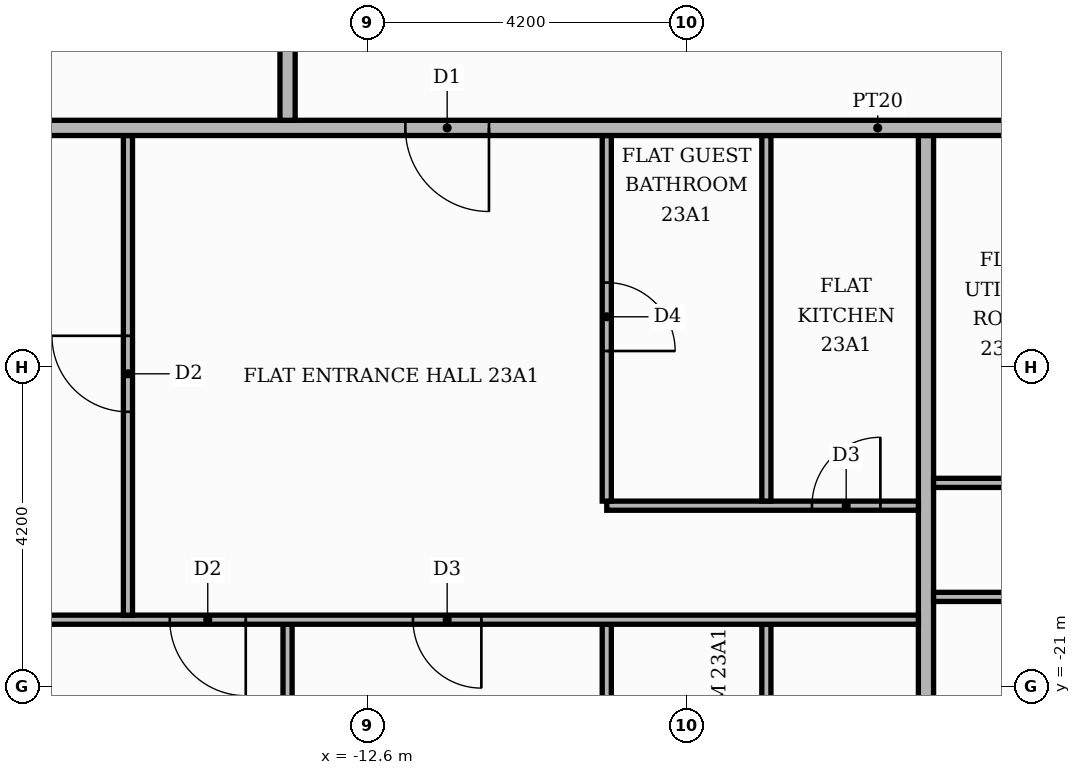
"""IFC4 building model, lengths in metres.
Left out: names, types, materials, properties, quantities, classifications, styles, units other than length and angle.
Written with IfcOpenShell. Run it as: python <this file> out.ifc"""

import sys

from ifc_helpers import new_model, si_unit, direction, frame, frame_2d, origin, place, context, subcontext, project, spatial, rectangle, extrude, element, fill, save


model = new_model("IFC4")
c1 = context("Model", 3, precision=1e-05, world=origin(), true_north=direction((0.0, 1.0)))
c2 = subcontext(c1, "Body", "Model", "MODEL_VIEW")
j1 = project(units=[si_unit("LENGTHUNIT", "METRE"), si_unit("PLANEANGLEUNIT", "RADIAN")], contexts=[c1])
p1 = place(None, origin())
s1 = spatial("IfcSite", under=j1, at=p1, CompositionType="ELEMENT")
p2 = place(p1, origin())
s2 = spatial("IfcBuilding", under=s1, at=p2, CompositionType="ELEMENT")
p3 = place(p2, frame((0.0, 0.0, 98.7)))
s3 = spatial("IfcBuildingStorey", under=s2, at=p3, CompositionType="ELEMENT", Elevation=98.7)
p4 = place(p3, frame((-13.65, -25.42, 0.0), z_axis=(0.0, 0.0, 1.0), x_axis=(0.0, 1.0, 0.0)))
e1 = element("IfcWall", 1, at=p4, inside=s3, PredefinedType="PARTITIONING", context=c2, shape_type="SweptSolid", body=[
    extrude(rectangle(XDim=5.24, YDim=0.12, at=frame_2d((2.62, 0.0))), origin(), (0.0, 0.0, 1.0), 3.48),
])
p5 = place(p3, frame((-9.45, -25.42, 0.0), z_axis=(0.0, 0.0, 1.0), x_axis=(0.0, 1.0, 0.0)))
e2 = element("IfcWall", 2, at=p5, inside=s3, PredefinedType="PARTITIONING", context=c2, shape_type="SweptSolid", body=[
    extrude(rectangle(XDim=5.24, YDim=0.12, at=frame_2d((2.62, 0.0))), origin(), (0.0, 0.0, 1.0), 3.48),
])
p6 = place(p5, frame((2.05, 0.0, 0.0)))
e3 = element("IfcOpeningElement", 3, at=p6, cuts=e2, PredefinedType="OPENING", context=c2, shape_type="SweptSolid", body=[
    extrude(rectangle(XDim=0.9, YDim=2.1, at=frame_2d((0.45, 1.05))), frame((0.0, 0.07, 0.0), z_axis=(0.0, -1.0, 0.0), x_axis=(1.0, 0.0, 0.0)), (0.0, 0.0, 1.0), 0.14),
])
p7 = place(p3, frame((-7.35, -25.42, 0.0), z_axis=(0.0, 0.0, 1.0), x_axis=(0.0, 1.0, 0.0)))
e4 = element("IfcWall", 4, at=p7, inside=s3, PredefinedType="PARTITIONING", context=c2, shape_type="SweptSolid", body=[
    extrude(rectangle(XDim=5.24, YDim=0.12, at=frame_2d((2.62, 0.0))), origin(), (0.0, 0.0, 1.0), 3.48),
])
p8 = place(p7, frame((2.05, 0.0, 0.0)))
e5 = element("IfcOpeningElement", 5, at=p8, cuts=e4, PredefinedType="OPENING", context=c2, shape_type="SweptSolid", body=[
    extrude(rectangle(XDim=0.9, YDim=2.1, at=frame_2d((0.45, 1.05))), frame((0.0, 0.07, 0.0), z_axis=(0.0, -1.0, 0.0), x_axis=(1.0, 0.0, 0.0)), (0.0, 0.0, 1.0), 0.14),
])
p9 = place(p3, frame((-5.25, -25.42, 0.0), z_axis=(0.0, 0.0, 1.0), x_axis=(0.0, 1.0, 0.0)))
e6 = element("IfcWall", 6, at=p9, inside=s3, PredefinedType="PARTITIONING", context=c2, shape_type="SweptSolid", body=[
    extrude(rectangle(XDim=11.67, YDim=0.2, at=frame_2d((5.835, 0.0))), origin(), (0.0, 0.0, 1.0), 3.48),
])
p10 = place(p3, frame((-17.4, -20.12, 0.0), z_axis=(0.0, 0.0, 1.0), x_axis=(1.0, 0.0, 0.0)))
e7 = element("IfcWall", 7, at=p10, inside=s3, PredefinedType="PARTITIONING", context=c2, shape_type="SweptSolid", body=[
    extrude(rectangle(XDim=12.05, YDim=0.12, at=frame_2d((6.025, 0.0))), origin(), (0.0, 0.0, 1.0), 3.48),
])
p11 = place(p10, frame((2.2, 0.0, 0.0)))
e8 = element("IfcOpeningElement", 8, at=p11, cuts=e7, PredefinedType="OPENING", context=c2, shape_type="SweptSolid", body=[
    extrude(rectangle(XDim=1.0, YDim=2.1, at=frame_2d((0.5, 1.05))), frame((0.0, 0.07, 0.0), z_axis=(0.0, -1.0, 0.0), x_axis=(1.0, 0.0, 0.0)), (0.0, 0.0, 1.0), 0.14),
])
p12 = place(p10, frame((5.4, 0.0, 0.0)))
e9 = element("IfcOpeningElement", 9, at=p12, cuts=e7, PredefinedType="OPENING", context=c2, shape_type="SweptSolid", body=[
    extrude(rectangle(XDim=0.9, YDim=2.1, at=frame_2d((0.45, 1.05))), frame((0.0, 0.07, 0.0), z_axis=(0.0, -1.0, 0.0), x_axis=(1.0, 0.0, 0.0)), (0.0, 0.0, 1.0), 0.14),
])
p13 = place(p3, frame((-15.75, -20.06, 0.0), z_axis=(0.0, 0.0, 1.0), x_axis=(0.0, 1.0, 0.0)))
e10 = element("IfcWall", 10, at=p13, inside=s3, PredefinedType="PARTITIONING", context=c2, shape_type="SweptSolid", body=[
    extrude(rectangle(XDim=6.31, YDim=0.12, at=frame_2d((3.155, 0.0))), origin(), (0.0, 0.0, 1.0), 3.48),
])
p14 = place(p13, frame((2.675, 0.0, 0.0)))
e11 = element("IfcOpeningElement", 11, at=p14, cuts=e10, PredefinedType="OPENING", context=c2, shape_type="SweptSolid", body=[
    extrude(rectangle(XDim=1.0, YDim=2.1, at=frame_2d((0.5, 1.05))), frame((0.0, 0.07, 0.0), z_axis=(0.0, -1.0, 0.0), x_axis=(1.0, 0.0, 0.0)), (0.0, 0.0, 1.0), 0.14),
])
p15 = place(p3, frame((-5.15, -19.82, 0.0), z_axis=(0.0, 0.0, 1.0), x_axis=(1.0, 0.0, 0.0)))
e12 = element("IfcWall", 12, at=p15, inside=s3, PredefinedType="PARTITIONING", context=c2, shape_type="SweptSolid", body=[
    extrude(rectangle(XDim=18.7, YDim=0.12, at=frame_2d((9.35, 0.0))), origin(), (0.0, 0.0, 1.0), 3.48),
])
p16 = place(p15, frame((1.5, 0.0, 0.0)))
e13 = element("IfcOpeningElement", 13, at=p16, cuts=e12, PredefinedType="OPENING", context=c2, shape_type="SweptSolid", body=[
    extrude(rectangle(XDim=1.0, YDim=2.1, at=frame_2d((0.5, 1.05))), frame((0.0, 0.07, 0.0), z_axis=(0.0, -1.0, 0.0), x_axis=(1.0, 0.0, 0.0)), (0.0, 0.0, 1.0), 0.14),
])
p17 = place(p15, frame((5.75, 0.0, 0.0)))
e14 = element("IfcOpeningElement", 14, at=p17, cuts=e12, PredefinedType="OPENING", context=c2, shape_type="SweptSolid", body=[
    extrude(rectangle(XDim=0.9, YDim=2.1, at=frame_2d((0.45, 1.05))), frame((0.0, 0.07, 0.0), z_axis=(0.0, -1.0, 0.0), x_axis=(1.0, 0.0, 0.0)), (0.0, 0.0, 1.0), 0.14),
])
p18 = place(p15, frame((14.15, 0.0, 0.0)))
e15 = element("IfcOpeningElement", 15, at=p18, cuts=e12, PredefinedType="OPENING", context=c2, shape_type="SweptSolid", body=[
    extrude(rectangle(XDim=0.9, YDim=2.1, at=frame_2d((0.45, 1.05))), frame((0.0, 0.07, 0.0), z_axis=(0.0, -1.0, 0.0), x_axis=(1.0, 0.0, 0.0)), (0.0, 0.0, 1.0), 0.14),
])
p19 = place(p3, frame((-9.45, -18.62, 0.0), z_axis=(0.0, 0.0, 1.0), x_axis=(1.0, 0.0, 0.0)))
e16 = element("IfcWall", 16, at=p19, inside=s3, PredefinedType="PARTITIONING", context=c2, shape_type="SweptSolid", body=[
    extrude(rectangle(XDim=4.1, YDim=0.12, at=frame_2d((2.05, 0.0))), origin(), (0.0, 0.0, 1.0), 3.48),
])
p20 = place(p19, frame((2.7, 0.0, 0.0)))
e17 = element("IfcOpeningElement", 17, at=p20, cuts=e16, PredefinedType="OPENING", context=c2, shape_type="SweptSolid", body=[
    extrude(rectangle(XDim=0.9, YDim=2.1, at=frame_2d((0.45, 1.05))), frame((0.0, 0.07, 0.0), z_axis=(0.0, -1.0, 0.0), x_axis=(1.0, 0.0, 0.0)), (0.0, 0.0, 1.0), 0.14),
])
p21 = place(p3, frame((-9.45, -18.56, 0.0), z_axis=(0.0, 0.0, 1.0), x_axis=(0.0, 1.0, 0.0)))
e18 = element("IfcWall", 18, at=p21, inside=s3, PredefinedType="PARTITIONING", context=c2, shape_type="SweptSolid", body=[
    extrude(rectangle(XDim=4.81, YDim=0.12, at=frame_2d((2.405, 0.0))), origin(), (0.0, 0.0, 1.0), 3.48),
])
p22 = place(p21, frame((1.975, 0.0, 0.0)))
e19 = element("IfcOpeningElement", 19, at=p22, cuts=e18, PredefinedType="OPENING", context=c2, shape_type="SweptSolid", body=[
    extrude(rectangle(XDim=0.9, YDim=2.1, at=frame_2d((0.45, 1.05))), frame((0.0, 0.07, 0.0), z_axis=(0.0, -1.0, 0.0), x_axis=(1.0, 0.0, 0.0)), (0.0, 0.0, 1.0), 0.14),
])
p23 = place(p3, frame((-7.35, -18.56, 0.0), z_axis=(0.0, 0.0, 1.0), x_axis=(0.0, 1.0, 0.0)))
e20 = element("IfcWall", 20, at=p23, inside=s3, PredefinedType="PARTITIONING", context=c2, shape_type="SweptSolid", body=[
    extrude(rectangle(XDim=4.81, YDim=0.12, at=frame_2d((2.405, 0.0))), origin(), (0.0, 0.0, 1.0), 3.48),
])
p24 = place(p3, frame((-5.15, -18.32, 0.0), z_axis=(0.0, 0.0, 1.0), x_axis=(1.0, 0.0, 0.0)))
e21 = element("IfcWall", 21, at=p24, inside=s3, PredefinedType="PARTITIONING", context=c2, shape_type="SweptSolid", body=[
    extrude(rectangle(XDim=2.0, YDim=0.12, at=frame_2d((1.0, 0.0))), origin(), (0.0, 0.0, 1.0), 3.48),
])
p25 = place(p3, frame((-25.42, -13.65, 0.0), z_axis=(0.0, 0.0, 1.0), x_axis=(1.0, 0.0, 0.0)))
e22 = element("IfcWall", 22, at=p25, inside=s3, PredefinedType="PARTITIONING", context=c2, shape_type="SweptSolid", body=[
    extrude(rectangle(XDim=39.07, YDim=0.2, at=frame_2d((19.535, 0.0))), origin(), (0.0, 0.0, 1.0), 3.48),
])
p26 = place(p25, frame((13.32, 0.0, 0.0)))
e23 = element("IfcOpeningElement", 23, at=p26, cuts=e22, PredefinedType="OPENING", context=c2, shape_type="SweptSolid", body=[
    extrude(rectangle(XDim=1.1, YDim=2.4, at=frame_2d((0.55, 1.2))), frame((0.0, 0.11, 0.0), z_axis=(0.0, -1.0, 0.0), x_axis=(1.0, 0.0, 0.0)), (0.0, 0.0, 1.0), 0.22),
])
p27 = place(p25, frame((23.82, 0.0, 0.0)))
e24 = element("IfcOpeningElement", 24, at=p27, cuts=e22, PredefinedType="OPENING", context=c2, shape_type="SweptSolid", body=[
    extrude(rectangle(XDim=1.1, YDim=2.4, at=frame_2d((0.55, 1.2))), frame((0.0, 0.11, 0.0), z_axis=(0.0, -1.0, 0.0), x_axis=(1.0, 0.0, 0.0)), (0.0, 0.0, 1.0), 0.22),
])
p28 = place(p3, frame((-13.65, -13.55, 0.0), z_axis=(0.0, 0.0, 1.0), x_axis=(0.0, 1.0, 0.0)))
e25 = element("IfcWall", 25, at=p28, inside=s3, PredefinedType="PARTITIONING", context=c2, shape_type="SweptSolid", body=[
    extrude(rectangle(XDim=27.1, YDim=0.2, at=frame_2d((13.55, 0.0))), origin(), (0.0, 0.0, 1.0), 3.48),
])
p29 = place(p28, frame((24.55, 0.0, 0.0)))
e26 = element("IfcOpeningElement", 26, at=p29, cuts=e25, PredefinedType="OPENING", context=c2, shape_type="SweptSolid", body=[
    extrude(rectangle(XDim=1.1, YDim=2.4, at=frame_2d((0.55, 1.2))), frame((0.0, 0.11, 0.0), z_axis=(0.0, -1.0, 0.0), x_axis=(1.0, 0.0, 0.0)), (0.0, 0.0, 1.0), 0.22),
])
p30 = place(p26, frame((1.1, 0.0, 0.0), z_axis=(0.0, 0.0, 1.0), x_axis=(-1.0, 0.0, 0.0)))
e27 = element("IfcDoor", 27, at=p30, inside=s3, OperationType="SINGLE_SWING_RIGHT", PredefinedType="DOOR", context=c2, shape_type="SweptSolid", body=[
    extrude(rectangle(XDim=1.1, YDim=2.4, at=frame_2d((0.55, 1.2))), frame((0.0, 0.025, 0.0), z_axis=(0.0, -1.0, 0.0), x_axis=(1.0, 0.0, 0.0)), (0.0, 0.0, 1.0), 0.05),
])
fill(e23, e27)
p31 = place(p14, origin())
e28 = element("IfcDoor", 28, at=p31, inside=s3, OperationType="SINGLE_SWING_RIGHT", PredefinedType="DOOR", context=c2, shape_type="SweptSolid", body=[
    extrude(rectangle(XDim=1.0, YDim=2.1, at=frame_2d((0.5, 1.05))), frame((0.0, 0.025, 0.0), z_axis=(0.0, -1.0, 0.0), x_axis=(1.0, 0.0, 0.0)), (0.0, 0.0, 1.0), 0.05),
])
fill(e11, e28)
p32 = place(p22, frame((0.9, 0.0, 0.0), z_axis=(0.0, 0.0, 1.0), x_axis=(-1.0, 0.0, 0.0)))
e29 = element("IfcDoor", 29, at=p32, inside=s3, OperationType="SINGLE_SWING_LEFT", PredefinedType="DOOR", context=c2, shape_type="SweptSolid", body=[
    extrude(rectangle(XDim=0.9, YDim=2.1, at=frame_2d((0.45, 1.05))), frame((0.0, 0.025, 0.0), z_axis=(0.0, -1.0, 0.0), x_axis=(1.0, 0.0, 0.0)), (0.0, 0.0, 1.0), 0.05),
])
fill(e19, e29)
p33 = place(p20, origin())
e30 = element("IfcDoor", 30, at=p33, inside=s3, OperationType="SINGLE_SWING_RIGHT", PredefinedType="DOOR", context=c2, shape_type="SweptSolid", body=[
    extrude(rectangle(XDim=0.9, YDim=2.1, at=frame_2d((0.45, 1.05))), frame((0.0, 0.025, 0.0), z_axis=(0.0, -1.0, 0.0), x_axis=(1.0, 0.0, 0.0)), (0.0, 0.0, 1.0), 0.05),
])
fill(e17, e30)
p34 = place(p11, frame((1.0, 0.0, 0.0), z_axis=(0.0, 0.0, 1.0), x_axis=(-1.0, 0.0, 0.0)))
e31 = element("IfcDoor", 31, at=p34, inside=s3, OperationType="SINGLE_SWING_RIGHT", PredefinedType="DOOR", context=c2, shape_type="SweptSolid", body=[
    extrude(rectangle(XDim=1.0, YDim=2.1, at=frame_2d((0.5, 1.05))), frame((0.0, 0.025, 0.0), z_axis=(0.0, -1.0, 0.0), x_axis=(1.0, 0.0, 0.0)), (0.0, 0.0, 1.0), 0.05),
])
fill(e8, e31)
p35 = place(p12, frame((0.9, 0.0, 0.0), z_axis=(0.0, 0.0, 1.0), x_axis=(-1.0, 0.0, 0.0)))
e32 = element("IfcDoor", 32, at=p35, inside=s3, OperationType="SINGLE_SWING_RIGHT", PredefinedType="DOOR", context=c2, shape_type="SweptSolid", body=[
    extrude(rectangle(XDim=0.9, YDim=2.1, at=frame_2d((0.45, 1.05))), frame((0.0, 0.025, 0.0), z_axis=(0.0, -1.0, 0.0), x_axis=(1.0, 0.0, 0.0)), (0.0, 0.0, 1.0), 0.05),
])
fill(e9, e32)
save(model, sys.argv[1])
